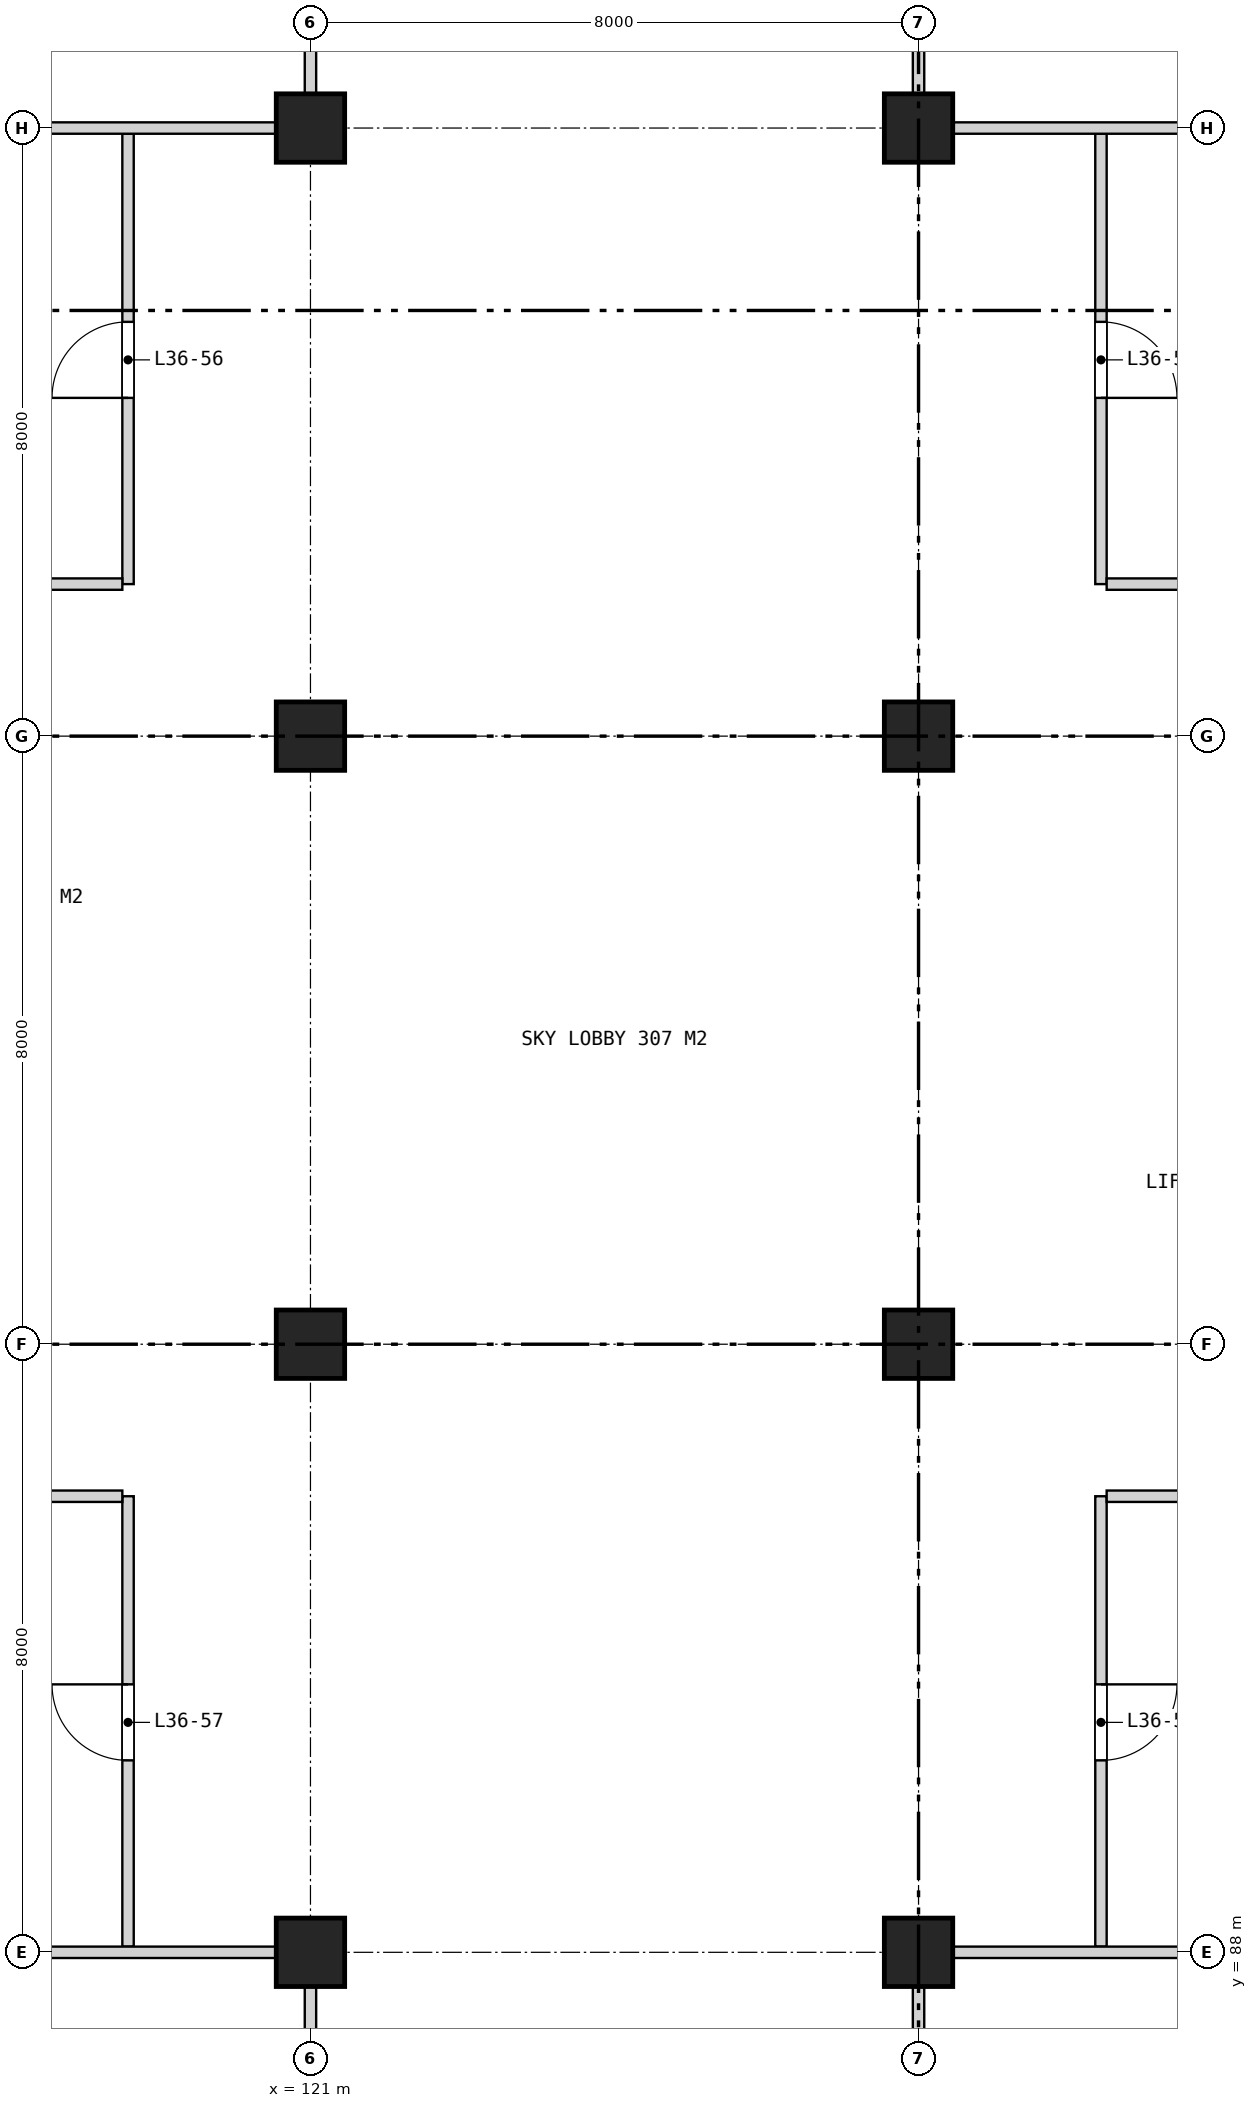
"""IFC4 building model, lengths in metres.
Left out: names, types, materials, properties, quantities, classifications, styles, units other than length and angle.
Written with IfcOpenShell. Run it as: python <this file> out.ifc"""

import sys

from ifc_helpers import new_model, si_unit, direction, frame, frame_2d, origin, origin_2d, place, context, subcontext, project, spatial, rectangle, extrude, element, fill, save


model = new_model("IFC4")
c1 = context("Model", 3, precision=1e-05, world=origin(), true_north=direction((0.0, 1.0)))
c2 = subcontext(c1, "Body", "Model", "MODEL_VIEW")
j1 = project(units=[si_unit("LENGTHUNIT", "METRE"), si_unit("PLANEANGLEUNIT", "RADIAN")], contexts=[c1])
p1 = place(None, origin())
s1 = spatial("IfcSite", under=j1, at=p1, CompositionType="ELEMENT")
p2 = place(p1, origin())
s2 = spatial("IfcBuilding", under=s1, at=p2, CompositionType="ELEMENT")
p3 = place(p2, frame((0.0, 0.0, 171.5)))
s3 = spatial("IfcBuildingStorey", under=s2, at=p3, CompositionType="ELEMENT", Elevation=171.5)
for number, where, z_axis, x_axis in (
    (1, (121.0, 88.0, 0.0), (0.0, 0.0, 1.0), (1.0, 0.0, 0.0)),
    (2, (121.0, 96.0, 0.0), (0.0, 0.0, 1.0), (1.0, 0.0, 0.0)),
    (3, (121.0, 104.0, 0.0), (0.0, 0.0, 1.0), (1.0, 0.0, 0.0)),
    (4, (121.0, 112.0, 0.0), (0.0, 0.0, 1.0), (1.0, 0.0, 0.0)),
    (5, (129.0, 88.0, 0.0), (0.0, 0.0, 1.0), (1.0, 0.0, 0.0)),
    (6, (129.0, 96.0, 0.0), (0.0, 0.0, 1.0), (1.0, 0.0, 0.0)),
    (7, (129.0, 104.0, 0.0), (0.0, 0.0, 1.0), (1.0, 0.0, 0.0)),
    (8, (129.0, 112.0, 0.0), (0.0, 0.0, 1.0), (1.0, 0.0, 0.0)),
):
    element("IfcColumn", number, at=place(p3, frame(where, z_axis=z_axis, x_axis=x_axis)), inside=s3, PredefinedType="COLUMN", context=c2, shape_type="SweptSolid", body=[
        extrude(rectangle(XDim=0.9, YDim=0.9, at=origin_2d()), origin(), (0.0, 0.0, 1.0), 7.4),
    ])
p4 = place(p3, frame((118.6, 88.075, 0.0), z_axis=(0.0, 0.0, 1.0), x_axis=(0.0, 1.0, 0.0)))
e9 = element("IfcWall", 9, at=p4, inside=s3, PredefinedType="PARTITIONING", context=c2, shape_type="SweptSolid", body=[
    extrude(rectangle(XDim=5.925, YDim=0.15, at=frame_2d((2.962, 0.0))), origin(), (0.0, 0.0, 1.0), 6.64),
])
p5 = place(p4, frame((2.45, 0.0, 0.0)))
e10 = element("IfcOpeningElement", 10, at=p5, cuts=e9, PredefinedType="OPENING", context=c2, shape_type="SweptSolid", body=[
    extrude(rectangle(XDim=1.0, YDim=2.1, at=frame_2d((0.5, 1.05))), frame((0.0, 0.085, 0.0), z_axis=(0.0, -1.0, 0.0), x_axis=(1.0, 0.0, 0.0)), (0.0, 0.0, 1.0), 0.17),
])
p6 = place(p3, frame((118.6, 106.0, 0.0), z_axis=(0.0, 0.0, 1.0), x_axis=(0.0, 1.0, 0.0)))
e11 = element("IfcWall", 11, at=p6, inside=s3, PredefinedType="PARTITIONING", context=c2, shape_type="SweptSolid", body=[
    extrude(rectangle(XDim=5.925, YDim=0.15, at=frame_2d((2.962, 0.0))), origin(), (0.0, 0.0, 1.0), 6.64),
])
p7 = place(p6, frame((2.45, 0.0, 0.0)))
e12 = element("IfcOpeningElement", 12, at=p7, cuts=e11, PredefinedType="OPENING", context=c2, shape_type="SweptSolid", body=[
    extrude(rectangle(XDim=1.0, YDim=2.1, at=frame_2d((0.5, 1.05))), frame((0.0, 0.085, 0.0), z_axis=(0.0, -1.0, 0.0), x_axis=(1.0, 0.0, 0.0)), (0.0, 0.0, 1.0), 0.17),
])
p8 = place(p3, frame((121.0, 71.63, 0.0), z_axis=(0.0, 0.0, 1.0), x_axis=(0.0, 1.0, 0.0)))
e13 = element("IfcWall", 13, at=p8, inside=s3, PredefinedType="PARTITIONING", context=c2, shape_type="SweptSolid", body=[
    extrude(rectangle(XDim=16.37, YDim=0.15, at=frame_2d((8.185, 0.0))), origin(), (0.0, 0.0, 1.0), 6.64),
])
p9 = place(p8, frame((6.02, 0.0, 0.0)))
e14 = element("IfcOpeningElement", 14, at=p9, cuts=e13, PredefinedType="OPENING", context=c2, shape_type="SweptSolid", body=[
    extrude(rectangle(XDim=1.8, YDim=2.1, at=frame_2d((0.9, 1.05))), frame((0.0, 0.085, 0.0), z_axis=(0.0, -1.0, 0.0), x_axis=(1.0, 0.0, 0.0)), (0.0, 0.0, 1.0), 0.17),
])
p10 = place(p3, frame((121.0, 112.0, 0.0), z_axis=(0.0, 0.0, 1.0), x_axis=(0.0, 1.0, 0.0)))
e15 = element("IfcWall", 15, at=p10, inside=s3, PredefinedType="PARTITIONING", context=c2, shape_type="SweptSolid", body=[
    extrude(rectangle(XDim=16.37, YDim=0.15, at=frame_2d((8.185, 0.0))), origin(), (0.0, 0.0, 1.0), 6.64),
])
p11 = place(p10, frame((5.65, 0.0, 0.0)))
e16 = element("IfcOpeningElement", 16, at=p11, cuts=e15, PredefinedType="OPENING", context=c2, shape_type="SweptSolid", body=[
    extrude(rectangle(XDim=1.8, YDim=2.1, at=frame_2d((0.9, 1.05))), frame((0.0, 0.085, 0.0), z_axis=(0.0, -1.0, 0.0), x_axis=(1.0, 0.0, 0.0)), (0.0, 0.0, 1.0), 0.17),
])
p12 = place(p3, frame((129.0, 71.63, 0.0), z_axis=(0.0, 0.0, 1.0), x_axis=(0.0, 1.0, 0.0)))
e17 = element("IfcWall", 17, at=p12, inside=s3, PredefinedType="PARTITIONING", context=c2, shape_type="SweptSolid", body=[
    extrude(rectangle(XDim=16.37, YDim=0.15, at=frame_2d((8.185, 0.0))), origin(), (0.0, 0.0, 1.0), 6.64),
])
p13 = place(p12, frame((11.82, 0.0, 0.0)))
e18 = element("IfcOpeningElement", 18, at=p13, cuts=e17, PredefinedType="OPENING", context=c2, shape_type="SweptSolid", body=[
    extrude(rectangle(XDim=1.0, YDim=2.1, at=frame_2d((0.5, 1.05))), frame((0.0, 0.085, 0.0), z_axis=(0.0, -1.0, 0.0), x_axis=(1.0, 0.0, 0.0)), (0.0, 0.0, 1.0), 0.17),
])
p14 = place(p12, frame((3.82, 0.0, 0.0)))
e19 = element("IfcOpeningElement", 19, at=p14, cuts=e17, PredefinedType="OPENING", context=c2, shape_type="SweptSolid", body=[
    extrude(rectangle(XDim=1.0, YDim=2.1, at=frame_2d((0.5, 1.05))), frame((0.0, 0.085, 0.0), z_axis=(0.0, -1.0, 0.0), x_axis=(1.0, 0.0, 0.0)), (0.0, 0.0, 1.0), 0.17),
])
p15 = place(p3, frame((129.0, 112.0, 0.0), z_axis=(0.0, 0.0, 1.0), x_axis=(0.0, 1.0, 0.0)))
e20 = element("IfcWall", 20, at=p15, inside=s3, PredefinedType="PARTITIONING", context=c2, shape_type="SweptSolid", body=[
    extrude(rectangle(XDim=16.37, YDim=0.15, at=frame_2d((8.185, 0.0))), origin(), (0.0, 0.0, 1.0), 6.64),
])
p16 = place(p15, frame((3.45, 0.0, 0.0)))
e21 = element("IfcOpeningElement", 21, at=p16, cuts=e20, PredefinedType="OPENING", context=c2, shape_type="SweptSolid", body=[
    extrude(rectangle(XDim=1.0, YDim=2.1, at=frame_2d((0.5, 1.05))), frame((0.0, 0.085, 0.0), z_axis=(0.0, -1.0, 0.0), x_axis=(1.0, 0.0, 0.0)), (0.0, 0.0, 1.0), 0.17),
])
p17 = place(p15, frame((11.45, 0.0, 0.0)))
e22 = element("IfcOpeningElement", 22, at=p17, cuts=e20, PredefinedType="OPENING", context=c2, shape_type="SweptSolid", body=[
    extrude(rectangle(XDim=1.0, YDim=2.1, at=frame_2d((0.5, 1.05))), frame((0.0, 0.085, 0.0), z_axis=(0.0, -1.0, 0.0), x_axis=(1.0, 0.0, 0.0)), (0.0, 0.0, 1.0), 0.17),
])
p18 = place(p3, frame((131.4, 88.075, 0.0), z_axis=(0.0, 0.0, 1.0), x_axis=(0.0, 1.0, 0.0)))
e23 = element("IfcWall", 23, at=p18, inside=s3, PredefinedType="PARTITIONING", context=c2, shape_type="SweptSolid", body=[
    extrude(rectangle(XDim=5.925, YDim=0.15, at=frame_2d((2.962, 0.0))), origin(), (0.0, 0.0, 1.0), 6.64),
])
p19 = place(p18, frame((2.45, 0.0, 0.0)))
e24 = element("IfcOpeningElement", 24, at=p19, cuts=e23, PredefinedType="OPENING", context=c2, shape_type="SweptSolid", body=[
    extrude(rectangle(XDim=1.0, YDim=2.1, at=frame_2d((0.5, 1.05))), frame((0.0, 0.085, 0.0), z_axis=(0.0, -1.0, 0.0), x_axis=(1.0, 0.0, 0.0)), (0.0, 0.0, 1.0), 0.17),
])
p20 = place(p3, frame((131.4, 106.0, 0.0), z_axis=(0.0, 0.0, 1.0), x_axis=(0.0, 1.0, 0.0)))
e25 = element("IfcWall", 25, at=p20, inside=s3, PredefinedType="PARTITIONING", context=c2, shape_type="SweptSolid", body=[
    extrude(rectangle(XDim=5.925, YDim=0.15, at=frame_2d((2.962, 0.0))), origin(), (0.0, 0.0, 1.0), 6.64),
])
p21 = place(p20, frame((2.45, 0.0, 0.0)))
e26 = element("IfcOpeningElement", 26, at=p21, cuts=e25, PredefinedType="OPENING", context=c2, shape_type="SweptSolid", body=[
    extrude(rectangle(XDim=1.0, YDim=2.1, at=frame_2d((0.5, 1.05))), frame((0.0, 0.085, 0.0), z_axis=(0.0, -1.0, 0.0), x_axis=(1.0, 0.0, 0.0)), (0.0, 0.0, 1.0), 0.17),
])
for number, where, z_axis, x_axis in (
    (27, (113.0, 88.0, 0.0), (0.0, 0.0, 1.0), (1.0, 0.0, 0.0)),
    (28, (129.075, 88.0, 0.0), (0.0, 0.0, 1.0), (1.0, 0.0, 0.0)),
):
    element("IfcWall", number, at=place(p3, frame(where, z_axis=z_axis, x_axis=x_axis)), inside=s3, PredefinedType="PARTITIONING", context=c2, shape_type="SweptSolid", body=[
        extrude(rectangle(XDim=7.925, YDim=0.15, at=frame_2d((3.962, 0.0))), origin(), (0.0, 0.0, 1.0), 6.64),
    ])
for number, where, z_axis, x_axis in (
    (29, (113.0, 94.0, 0.0), (0.0, 0.0, 1.0), (1.0, 0.0, 0.0)),
    (30, (131.475, 94.0, 0.0), (0.0, 0.0, 1.0), (1.0, 0.0, 0.0)),
    (31, (113.0, 106.0, 0.0), (0.0, 0.0, 1.0), (1.0, 0.0, 0.0)),
    (32, (131.475, 106.0, 0.0), (0.0, 0.0, 1.0), (1.0, 0.0, 0.0)),
):
    element("IfcWall", number, at=place(p3, frame(where, z_axis=z_axis, x_axis=x_axis)), inside=s3, PredefinedType="PARTITIONING", context=c2, shape_type="SweptSolid", body=[
        extrude(rectangle(XDim=5.525, YDim=0.15, at=frame_2d((2.762, 0.0))), origin(), (0.0, 0.0, 1.0), 6.64),
    ])
for number, where, z_axis, x_axis in (
    (33, (113.0, 112.0, 0.0), (0.0, 0.0, 1.0), (1.0, 0.0, 0.0)),
    (34, (129.075, 112.0, 0.0), (0.0, 0.0, 1.0), (1.0, 0.0, 0.0)),
):
    element("IfcWall", number, at=place(p3, frame(where, z_axis=z_axis, x_axis=x_axis)), inside=s3, PredefinedType="PARTITIONING", context=c2, shape_type="SweptSolid", body=[
        extrude(rectangle(XDim=7.925, YDim=0.15, at=frame_2d((3.962, 0.0))), origin(), (0.0, 0.0, 1.0), 6.64),
    ])
p22 = place(p7, origin())
e35 = element("IfcDoor", 35, at=p22, inside=s3, OperationType="SINGLE_SWING_LEFT", PredefinedType="DOOR", context=c2, shape_type="SweptSolid", body=[
    extrude(rectangle(XDim=1.0, YDim=2.1, at=frame_2d((0.5, 1.05))), frame((0.0, 0.025, 0.0), z_axis=(0.0, -1.0, 0.0), x_axis=(1.0, 0.0, 0.0)), (0.0, 0.0, 1.0), 0.05),
])
fill(e12, e35)
p23 = place(p5, origin())
e36 = element("IfcDoor", 36, at=p23, inside=s3, OperationType="SINGLE_SWING_RIGHT", PredefinedType="DOOR", context=c2, shape_type="SweptSolid", body=[
    extrude(rectangle(XDim=1.0, YDim=2.1, at=frame_2d((0.5, 1.05))), frame((0.0, 0.025, 0.0), z_axis=(0.0, -1.0, 0.0), x_axis=(1.0, 0.0, 0.0)), (0.0, 0.0, 1.0), 0.05),
])
fill(e10, e36)
p24 = place(p21, frame((1.0, 0.0, 0.0), z_axis=(0.0, 0.0, 1.0), x_axis=(-1.0, 0.0, 0.0)))
e37 = element("IfcDoor", 37, at=p24, inside=s3, OperationType="SINGLE_SWING_RIGHT", PredefinedType="DOOR", context=c2, shape_type="SweptSolid", body=[
    extrude(rectangle(XDim=1.0, YDim=2.1, at=frame_2d((0.5, 1.05))), frame((0.0, 0.025, 0.0), z_axis=(0.0, -1.0, 0.0), x_axis=(1.0, 0.0, 0.0)), (0.0, 0.0, 1.0), 0.05),
])
fill(e26, e37)
p25 = place(p19, frame((1.0, 0.0, 0.0), z_axis=(0.0, 0.0, 1.0), x_axis=(-1.0, 0.0, 0.0)))
e38 = element("IfcDoor", 38, at=p25, inside=s3, OperationType="SINGLE_SWING_LEFT", PredefinedType="DOOR", context=c2, shape_type="SweptSolid", body=[
    extrude(rectangle(XDim=1.0, YDim=2.1, at=frame_2d((0.5, 1.05))), frame((0.0, 0.025, 0.0), z_axis=(0.0, -1.0, 0.0), x_axis=(1.0, 0.0, 0.0)), (0.0, 0.0, 1.0), 0.05),
])
fill(e24, e38)
save(model, sys.argv[1])
